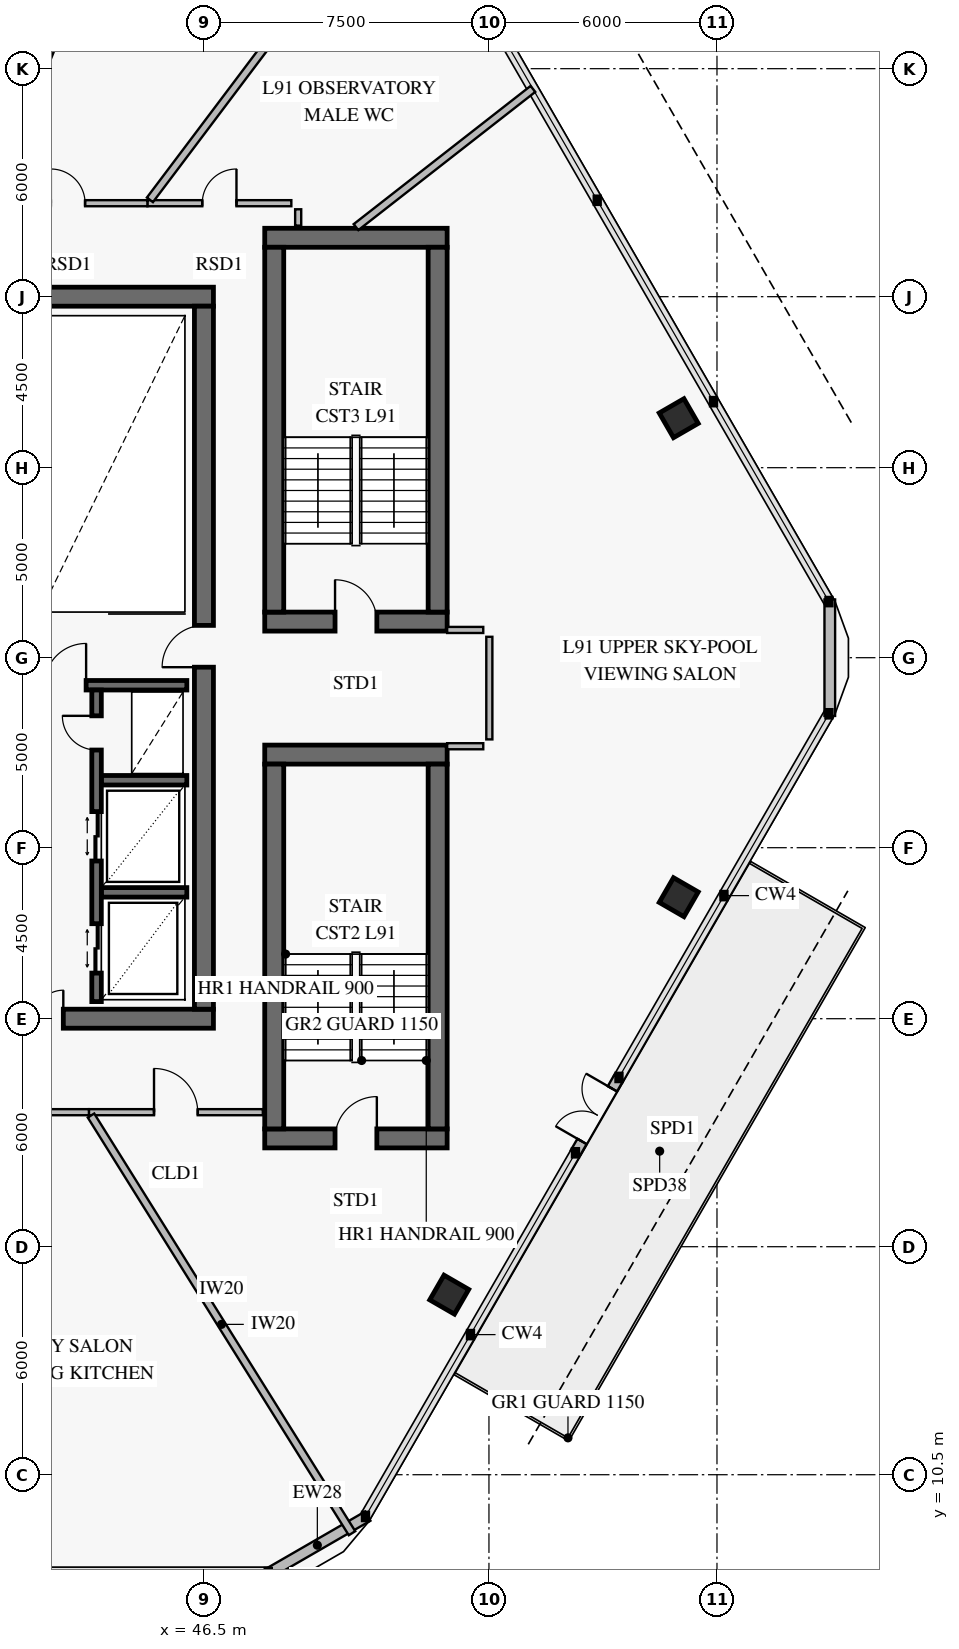
"""IFC4 building model, lengths in metres.
Left out: names, types, materials, properties, quantities, classifications, styles, units other than length and angle.
Written with IfcOpenShell. Run it as: python <this file> out.ifc"""

import sys

from ifc_helpers import new_model, si_unit, direction, frame, frame_2d, origin, origin_2d, place, context, subcontext, project, spatial, rectangle, extrude, element, fill, save


model = new_model("IFC4")
c1 = context("Model", 3, precision=1e-05, world=origin(), true_north=direction((0.0, 1.0)))
c2 = subcontext(c1, "Body", "Model", "MODEL_VIEW")
j1 = project(units=[si_unit("LENGTHUNIT", "METRE"), si_unit("PLANEANGLEUNIT", "RADIAN")], contexts=[c1])
p1 = place(None, origin())
s1 = spatial("IfcSite", under=j1, at=p1, CompositionType="ELEMENT")
p2 = place(p1, origin())
s2 = spatial("IfcBuilding", under=s1, at=p2, CompositionType="ELEMENT")
p3 = place(p2, frame((0.0, 0.0, 357.6)))
s3 = spatial("IfcBuildingStorey", under=s2, at=p3, CompositionType="ELEMENT", Elevation=357.6)
p4 = place(p3, frame((37.35, 22.5, 0.0), z_axis=(0.0, 0.0, 1.0), x_axis=(1.0, 0.0, 0.0)))
e1 = element("IfcWall", 1, at=p4, inside=s3, PredefinedType="SHEAR", context=c2, shape_type="SweptSolid", body=[
    extrude(rectangle(XDim=9.4, YDim=0.5, at=frame_2d((4.7, 0.0))), origin(), (0.0, 0.0, 1.0), 3.8),
])
p5 = place(p4, frame((3.95, 0.0, 0.0)))
e2 = element("IfcOpeningElement", 2, at=p5, cuts=e1, PredefinedType="OPENING", context=c2, shape_type="SweptSolid", body=[
    extrude(rectangle(XDim=1.5, YDim=2.15, at=frame_2d((0.75, 1.075))), frame((0.0, 0.262, 0.0), z_axis=(0.0, -1.0, 0.0), x_axis=(1.0, 0.0, 0.0)), (0.0, 0.0, 1.0), 0.524),
])
p6 = place(p3, frame((46.75, 41.5, 0.0), z_axis=(0.0, 0.0, 1.0), x_axis=(-1.0, 0.0, 0.0)))
e3 = element("IfcWall", 3, at=p6, inside=s3, PredefinedType="SHEAR", context=c2, shape_type="SweptSolid", body=[
    extrude(rectangle(XDim=7.8, YDim=0.5, at=frame_2d((3.9, 0.0))), origin(), (0.0, 0.0, 1.0), 3.8),
])
p7 = place(p3, frame((46.5, 22.75, 0.0), z_axis=(0.0, 0.0, 1.0), x_axis=(0.0, 1.0, 0.0)))
e4 = element("IfcWall", 4, at=p7, inside=s3, PredefinedType="SHEAR", context=c2, shape_type="SweptSolid", body=[
    extrude(rectangle(XDim=18.5, YDim=0.5, at=frame_2d((9.25, 0.0))), origin(), (0.0, 0.0, 1.0), 3.8),
])
p8 = place(p7, frame((9.0, 0.0, 0.0)))
e5 = element("IfcOpeningElement", 5, at=p8, cuts=e4, PredefinedType="OPENING", context=c2, shape_type="SweptSolid", body=[
    extrude(rectangle(XDim=1.1, YDim=2.15, at=frame_2d((0.55, 1.075))), frame((0.0, 0.262, 0.0), z_axis=(0.0, -1.0, 0.0), x_axis=(1.0, 0.0, 0.0)), (0.0, 0.0, 1.0), 0.524),
])
for number, where, z_axis, x_axis in (
    (6, (58.993, 38.302, 0.0), (0.0, 0.0, 1.0), (-0.5, 0.866, 0.0)),
    (7, (52.955, 15.238, 0.0), (0.0, 0.0, 1.0), (0.5, 0.866, 0.0)),
    (8, (58.993, 25.698, 0.0), (0.0, 0.0, 1.0), (0.5, 0.866, 0.0)),
):
    element("IfcColumn", number, at=place(p3, frame(where, z_axis=z_axis, x_axis=x_axis)), inside=s3, PredefinedType="COLUMN", context=c2, shape_type="SweptSolid", body=[
        extrude(rectangle(XDim=0.75, YDim=0.75, at=origin_2d()), origin(), (0.0, 0.0, 1.0), 3.35),
    ])
p9 = place(p3, frame((48.1, 19.35, 0.0), z_axis=(0.0, 0.0, 1.0), x_axis=(1.0, 0.0, 0.0)))
e9 = element("IfcWall", 9, at=p9, inside=s3, PredefinedType="SHEAR", context=c2, shape_type="SweptSolid", body=[
    extrude(rectangle(XDim=4.8, YDim=0.5, at=frame_2d((2.4, 0.0))), origin(), (0.0, 0.0, 1.0), 3.8),
])
p10 = place(p9, frame((1.85, 0.0, 0.0)))
e10 = element("IfcOpeningElement", 10, at=p10, cuts=e9, PredefinedType="OPENING", context=c2, shape_type="SweptSolid", body=[
    extrude(rectangle(XDim=1.1, YDim=2.15, at=frame_2d((0.55, 1.075))), frame((0.0, 0.262, 0.0), z_axis=(0.0, -1.0, 0.0), x_axis=(1.0, 0.0, 0.0)), (0.0, 0.0, 1.0), 0.524),
])
p11 = place(p3, frame((52.9, 29.45, 0.0), z_axis=(0.0, 0.0, 1.0), x_axis=(-1.0, 0.0, 0.0)))
e11 = element("IfcWall", 11, at=p11, inside=s3, PredefinedType="SHEAR", context=c2, shape_type="SweptSolid", body=[
    extrude(rectangle(XDim=4.8, YDim=0.5, at=frame_2d((2.4, 0.0))), origin(), (0.0, 0.0, 1.0), 3.8),
])
for number, where, z_axis, x_axis in (
    (12, (48.35, 19.6, 0.0), (0.0, 0.0, 1.0), (0.0, 1.0, 0.0)),
    (13, (52.65, 29.2, 0.0), (0.0, 0.0, 1.0), (0.0, -1.0, 0.0)),
):
    element("IfcWall", number, at=place(p3, frame(where, z_axis=z_axis, x_axis=x_axis)), inside=s3, PredefinedType="SHEAR", context=c2, shape_type="SweptSolid", body=[
        extrude(rectangle(XDim=9.6, YDim=0.5, at=frame_2d((4.8, 0.0))), origin(), (0.0, 0.0, 1.0), 3.8),
    ])
p12 = place(p3, frame((48.1, 32.95, 0.0), z_axis=(0.0, 0.0, 1.0), x_axis=(1.0, 0.0, 0.0)))
e14 = element("IfcWall", 14, at=p12, inside=s3, PredefinedType="SHEAR", context=c2, shape_type="SweptSolid", body=[
    extrude(rectangle(XDim=4.8, YDim=0.5, at=frame_2d((2.4, 0.0))), origin(), (0.0, 0.0, 1.0), 3.8),
])
p13 = place(p12, frame((1.85, 0.0, 0.0)))
e15 = element("IfcOpeningElement", 15, at=p13, cuts=e14, PredefinedType="OPENING", context=c2, shape_type="SweptSolid", body=[
    extrude(rectangle(XDim=1.1, YDim=2.15, at=frame_2d((0.55, 1.075))), frame((0.0, 0.262, 0.0), z_axis=(0.0, -1.0, 0.0), x_axis=(1.0, 0.0, 0.0)), (0.0, 0.0, 1.0), 0.524),
])
p14 = place(p3, frame((52.9, 43.05, 0.0), z_axis=(0.0, 0.0, 1.0), x_axis=(-1.0, 0.0, 0.0)))
e16 = element("IfcWall", 16, at=p14, inside=s3, PredefinedType="SHEAR", context=c2, shape_type="SweptSolid", body=[
    extrude(rectangle(XDim=4.8, YDim=0.5, at=frame_2d((2.4, 0.0))), origin(), (0.0, 0.0, 1.0), 3.8),
])
for number, where, z_axis, x_axis in (
    (17, (48.35, 33.2, 0.0), (0.0, 0.0, 1.0), (0.0, 1.0, 0.0)),
    (18, (52.65, 42.8, 0.0), (0.0, 0.0, 1.0), (0.0, -1.0, 0.0)),
):
    element("IfcWall", number, at=place(p3, frame(where, z_axis=z_axis, x_axis=x_axis)), inside=s3, PredefinedType="SHEAR", context=c2, shape_type="SweptSolid", body=[
        extrude(rectangle(XDim=9.6, YDim=0.5, at=frame_2d((4.8, 0.0))), origin(), (0.0, 0.0, 1.0), 3.8),
    ])
p15 = place(p3, frame((57.421, 20.955, 0.0), z_axis=(0.0, 0.0, 1.0), x_axis=(-0.499968531483, -0.866043571379, 0.0)))
e19 = element("IfcWall", 19, at=p15, inside=s3, PredefinedType="SOLIDWALL", context=c2, shape_type="SweptSolid", body=[
    extrude(rectangle(XDim=2.29, YDim=0.28, at=frame_2d((1.145, 0.0))), origin(), (0.0, 0.0, 1.0), 3.35),
])
p16 = place(p15, frame((0.345, 0.0, 0.0)))
e20 = element("IfcOpeningElement", 20, at=p16, cuts=e19, PredefinedType="OPENING", context=c2, shape_type="SweptSolid", body=[
    extrude(rectangle(XDim=1.6, YDim=2.3, at=frame_2d((0.8, 1.15))), frame((0.0, 0.152, 0.0), z_axis=(0.0, -1.0, 0.0), x_axis=(1.0, 0.0, 0.0)), (0.0, 0.0, 1.0), 0.304),
])
for number, where, z_axis, x_axis in (
    (21, (50.811, 9.411, 0.0), (0.0, 0.0, 1.0), (-0.866, -0.5, 0.0)),
    (22, (62.969, 33.532, 0.0), (0.0, 0.0, 1.0), (0.0, -1.0, 0.0)),
):
    element("IfcWall", number, at=place(p3, frame(where, z_axis=z_axis, x_axis=x_axis)), inside=s3, PredefinedType="SOLIDWALL", context=c2, shape_type="SweptSolid", body=[
        extrude(rectangle(XDim=3.065, YDim=0.28, at=frame_2d((1.532, 0.0))), origin(), (0.0, 0.0, 1.0), 3.35),
    ])
p17 = place(p3, frame((25.95, 31.275, 0.0), z_axis=(0.0, 0.0, 1.0), x_axis=(1.0, 0.0, 0.0)))
e23 = element("IfcWall", 23, at=p17, inside=s3, PredefinedType="SOLIDWALL", context=c2, shape_type="SweptSolid", body=[
    extrude(rectangle(XDim=20.1, YDim=0.25, at=frame_2d((10.05, 0.0))), origin(), (0.0, 0.0, 1.0), 3.8),
])
p18 = place(p17, frame((2.6, 0.0, 0.0)))
e24 = element("IfcOpeningElement", 24, at=p18, cuts=e23, PredefinedType="OPENING", context=c2, shape_type="SweptSolid", body=[
    extrude(rectangle(XDim=1.1, YDim=2.15, at=frame_2d((0.55, 1.075))), frame((0.0, 0.137, 0.0), z_axis=(0.0, -1.0, 0.0), x_axis=(1.0, 0.0, 0.0)), (0.0, 0.0, 1.0), 0.274),
])
p19 = place(p17, frame((10.6, 0.0, 0.0)))
e25 = element("IfcOpeningElement", 25, at=p19, cuts=e23, PredefinedType="OPENING", context=c2, shape_type="SweptSolid", body=[
    extrude(rectangle(XDim=1.1, YDim=2.15, at=frame_2d((0.55, 1.075))), frame((0.0, 0.137, 0.0), z_axis=(0.0, -1.0, 0.0), x_axis=(1.0, 0.0, 0.0)), (0.0, 0.0, 1.0), 0.274),
])
p20 = place(p17, frame((16.35, 0.0, 0.0)))
e26 = element("IfcOpeningElement", 26, at=p20, cuts=e23, PredefinedType="OPENING", context=c2, shape_type="SweptSolid", body=[
    extrude(rectangle(XDim=1.1, YDim=2.15, at=frame_2d((0.55, 1.075))), frame((0.0, 0.137, 0.0), z_axis=(0.0, -1.0, 0.0), x_axis=(1.0, 0.0, 0.0)), (0.0, 0.0, 1.0), 0.274),
])
for number, where, z_axis, x_axis in (
    (27, (43.8, 25.825, 0.0), (0.0, 0.0, 1.0), (1.0, 0.0, 0.0)),
    (28, (43.8, 28.775, 0.0), (0.0, 0.0, 1.0), (1.0, 0.0, 0.0)),
):
    element("IfcWall", number, at=place(p3, frame(where, z_axis=z_axis, x_axis=x_axis)), inside=s3, PredefinedType="SOLIDWALL", context=c2, shape_type="SweptSolid", body=[
        extrude(rectangle(XDim=2.25, YDim=0.25, at=frame_2d((1.125, 0.0))), origin(), (0.0, 0.0, 1.0), 3.8),
    ])
p21 = place(p3, frame((43.675, 22.95, 0.0), z_axis=(0.0, 0.0, 1.0), x_axis=(0.0, 1.0, 0.0)))
e29 = element("IfcWall", 29, at=p21, inside=s3, PredefinedType="SOLIDWALL", context=c2, shape_type="SweptSolid", body=[
    extrude(rectangle(XDim=8.2, YDim=0.25, at=frame_2d((4.1, 0.0))), origin(), (0.0, 0.0, 1.0), 3.8),
])
p22 = place(p21, frame((0.75, 0.0, 0.0)))
e30 = element("IfcOpeningElement", 30, at=p22, cuts=e29, PredefinedType="OPENING", context=c2, shape_type="SweptSolid", body=[
    extrude(rectangle(XDim=1.3, YDim=2.3, at=frame_2d((0.65, 1.15))), frame((0.0, 0.137, 0.0), z_axis=(0.0, -1.0, 0.0), x_axis=(1.0, 0.0, 0.0)), (0.0, 0.0, 1.0), 0.274),
])
p23 = place(p21, frame((3.7, 0.0, 0.0)))
e31 = element("IfcOpeningElement", 31, at=p23, cuts=e29, PredefinedType="OPENING", context=c2, shape_type="SweptSolid", body=[
    extrude(rectangle(XDim=1.3, YDim=2.3, at=frame_2d((0.65, 1.15))), frame((0.0, 0.137, 0.0), z_axis=(0.0, -1.0, 0.0), x_axis=(1.0, 0.0, 0.0)), (0.0, 0.0, 1.0), 0.274),
])
p24 = place(p21, frame((6.62, 0.0, 0.0)))
e32 = element("IfcOpeningElement", 32, at=p24, cuts=e29, PredefinedType="OPENING", context=c2, shape_type="SweptSolid", body=[
    extrude(rectangle(XDim=0.9, YDim=2.1, at=frame_2d((0.45, 1.05))), frame((0.0, 0.137, 0.0), z_axis=(0.0, -1.0, 0.0), x_axis=(1.0, 0.0, 0.0)), (0.0, 0.0, 1.0), 0.274),
])
p25 = place(p3, frame((43.473, 20.04, 0.0), z_axis=(0.0, 0.0, 1.0), x_axis=(1.0, 0.0, 0.0)))
e33 = element("IfcWall", 33, at=p25, inside=s3, PredefinedType="PARTITIONING", context=c2, shape_type="SweptSolid", body=[
    extrude(rectangle(XDim=4.577, YDim=0.16, at=frame_2d((2.288, 0.0))), origin(), (0.0, 0.0, 1.0), 3.35),
])
p26 = place(p25, frame((1.713, 0.0, 0.0)))
e34 = element("IfcOpeningElement", 34, at=p26, cuts=e33, PredefinedType="OPENING", context=c2, shape_type="SweptSolid", body=[
    extrude(rectangle(XDim=1.15, YDim=2.2, at=frame_2d((0.575, 1.1))), frame((0.0, 0.092, 0.0), z_axis=(0.0, -1.0, 0.0), x_axis=(1.0, 0.0, 0.0)), (0.0, 0.0, 1.0), 0.184),
])
p27 = place(p3, frame((48.8, 43.96, 0.0), z_axis=(0.0, 0.0, 1.0), x_axis=(-1.0, 0.0, 0.0)))
e35 = element("IfcWall", 35, at=p27, inside=s3, PredefinedType="PARTITIONING", context=c2, shape_type="SweptSolid", body=[
    extrude(rectangle(XDim=3.788, YDim=0.16, at=frame_2d((1.894, 0.0))), origin(), (0.0, 0.0, 1.0), 3.35),
])
p28 = place(p27, frame((1.444, 0.0, 0.0)))
e36 = element("IfcOpeningElement", 36, at=p28, cuts=e35, PredefinedType="OPENING", context=c2, shape_type="SweptSolid", body=[
    extrude(rectangle(XDim=0.9, YDim=2.1, at=frame_2d((0.45, 1.05))), frame((0.0, 0.092, 0.0), z_axis=(0.0, -1.0, 0.0), x_axis=(1.0, 0.0, 0.0)), (0.0, 0.0, 1.0), 0.184),
])
p29 = place(p3, frame((45.012, 43.96, 0.0), z_axis=(0.0, 0.0, 1.0), x_axis=(-1.0, 0.0, 0.0)))
e37 = element("IfcWall", 37, at=p29, inside=s3, PredefinedType="PARTITIONING", context=c2, shape_type="SweptSolid", body=[
    extrude(rectangle(XDim=4.18, YDim=0.16, at=frame_2d((2.09, 0.0))), origin(), (0.0, 0.0, 1.0), 3.35),
])
p30 = place(p29, frame((1.64, 0.0, 0.0)))
e38 = element("IfcOpeningElement", 38, at=p30, cuts=e37, PredefinedType="OPENING", context=c2, shape_type="SweptSolid", body=[
    extrude(rectangle(XDim=0.9, YDim=2.1, at=frame_2d((0.45, 1.05))), frame((0.0, 0.092, 0.0), z_axis=(0.0, -1.0, 0.0), x_axis=(1.0, 0.0, 0.0)), (0.0, 0.0, 1.0), 0.184),
])
p31 = place(p3, frame((37.681, 20.04, 0.0), z_axis=(0.0, 0.0, 1.0), x_axis=(1.0, 0.0, 0.0)))
e39 = element("IfcWall", 39, at=p31, inside=s3, PredefinedType="PARTITIONING", context=c2, shape_type="SweptSolid", body=[
    extrude(rectangle(XDim=5.792, YDim=0.16, at=frame_2d((2.896, 0.0))), origin(), (0.0, 0.0, 1.0), 2.8),
])
p32 = place(p31, frame((2.421, 0.0, 0.0)))
e40 = element("IfcOpeningElement", 40, at=p32, cuts=e39, PredefinedType="OPENING", context=c2, shape_type="SweptSolid", body=[
    extrude(rectangle(XDim=0.95, YDim=2.1, at=frame_2d((0.475, 1.05))), frame((0.0, 0.092, 0.0), z_axis=(0.0, -1.0, 0.0), x_axis=(1.0, 0.0, 0.0)), (0.0, 0.0, 1.0), 0.184),
])
p33 = place(p3, frame((43.528, 19.952, 0.0), z_axis=(0.0, 0.0, 1.0), x_axis=(0.529929518021, -0.848041688793, 0.0)))
e41 = element("IfcWall", 41, at=p33, inside=s3, PredefinedType="PARTITIONING", context=c2, shape_type="SweptSolid", body=[
    extrude(rectangle(XDim=12.961, YDim=0.2, at=frame_2d((6.48, 0.0))), origin(), (0.0, 0.0, 1.0), 2.77),
])
p34 = place(p3, frame((54.01, 29.85, 0.0), z_axis=(0.0, 0.0, 1.0), x_axis=(0.0, 1.0, 0.0)))
e42 = element("IfcWall", 42, at=p34, inside=s3, PredefinedType="PARTITIONING", context=c2, shape_type="SweptSolid", body=[
    extrude(rectangle(XDim=2.7, YDim=0.16, at=frame_2d((1.35, 0.0))), origin(), (0.0, 0.0, 1.0), 3.35),
])
p35 = place(p3, frame((50.502, 43.33, 0.0), z_axis=(0.0, 0.0, 1.0), x_axis=(0.788021867537, 0.615647249879, 0.0)))
e43 = element("IfcWall", 43, at=p35, inside=s3, PredefinedType="PARTITIONING", context=c2, shape_type="SweptSolid", body=[
    extrude(rectangle(XDim=5.907, YDim=0.2, at=frame_2d((2.954, 0.0))), origin(), (0.0, 0.0, 1.0), 2.77),
])
p36 = place(p3, frame((45.079, 44.048, 0.0), z_axis=(0.0, 0.0, 1.0), x_axis=(0.601830257004, 0.798624030288, 0.0)))
e44 = element("IfcWall", 44, at=p36, inside=s3, PredefinedType="PARTITIONING", context=c2, shape_type="SweptSolid", body=[
    extrude(rectangle(XDim=11.067, YDim=0.2, at=frame_2d((5.534, 0.0))), origin(), (0.0, 0.0, 1.0), 2.77),
])
p37 = place(p3, frame((40.868, 44.048, 0.0), z_axis=(0.0, 0.0, 1.0), x_axis=(0.374624373524, 0.927176670738, 0.0)))
e45 = element("IfcWall", 45, at=p37, inside=s3, PredefinedType="PARTITIONING", context=c2, shape_type="SweptSolid", body=[
    extrude(rectangle(XDim=4.254, YDim=0.2, at=frame_2d((2.127, 0.0))), origin(), (0.0, 0.0, 1.0), 3.35),
])
for number, where, z_axis, x_axis in (
    (46, (52.9, 29.67, 0.0), (0.0, 0.0, 1.0), (1.0, 0.0, 0.0)),
    (47, (53.85, 32.73, 0.0), (0.0, 0.0, 1.0), (-1.0, 0.0, 0.0)),
):
    element("IfcWall", number, at=place(p3, frame(where, z_axis=z_axis, x_axis=x_axis)), inside=s3, PredefinedType="PARTITIONING", context=c2, shape_type="SweptSolid", body=[
        extrude(rectangle(XDim=0.95, YDim=0.16, at=frame_2d((0.475, 0.0))), origin(), (0.0, 0.0, 1.0), 3.35),
    ])
p38 = place(p3, frame((48.98, 43.37, 0.0), z_axis=(0.0, 0.0, 1.0), x_axis=(0.0, 1.0, 0.0)))
e48 = element("IfcWall", 48, at=p38, inside=s3, PredefinedType="PARTITIONING", context=c2, shape_type="SweptSolid", body=[
    extrude(rectangle(XDim=0.43, YDim=0.16, at=frame_2d((0.215, 0.0))), origin(), (0.0, 0.0, 1.0), 3.35),
])
p39 = place(p16, frame((1.6, 0.0, 0.0), z_axis=(0.0, 0.0, 1.0), x_axis=(-1.0, 0.0, 0.0)))
e49 = element("IfcDoor", 49, at=p39, inside=s3, OperationType="DOUBLE_DOOR_SINGLE_SWING", PredefinedType="DOOR", context=c2, shape_type="SweptSolid", body=[
    extrude(rectangle(XDim=1.6, YDim=2.3, at=frame_2d((0.8, 1.15))), frame((0.0, 0.025, 0.0), z_axis=(0.0, -1.0, 0.0), x_axis=(1.0, 0.0, 0.0)), (0.0, 0.0, 1.0), 0.05),
])
fill(e20, e49)
p40 = place(p8, origin())
e50 = element("IfcDoor", 50, at=p40, inside=s3, OperationType="SINGLE_SWING_LEFT", PredefinedType="USERDEFINED", context=c2, shape_type="SweptSolid", body=[
    extrude(rectangle(XDim=1.1, YDim=2.15, at=frame_2d((0.55, 1.075))), frame((0.0, 0.025, 0.0), z_axis=(0.0, -1.0, 0.0), x_axis=(1.0, 0.0, 0.0)), (0.0, 0.0, 1.0), 0.05),
])
fill(e5, e50)
p41 = place(p5, origin())
e51 = element("IfcDoor", 51, at=p41, inside=s3, OperationType="DOUBLE_DOOR_SINGLE_SWING", PredefinedType="DOOR", context=c2, shape_type="SweptSolid", body=[
    extrude(rectangle(XDim=1.5, YDim=2.15, at=frame_2d((0.75, 1.075))), frame((0.0, 0.025, 0.0), z_axis=(0.0, -1.0, 0.0), x_axis=(1.0, 0.0, 0.0)), (0.0, 0.0, 1.0), 0.05),
])
fill(e2, e51)
p42 = place(p10, origin())
e52 = element("IfcDoor", 52, at=p42, inside=s3, OperationType="SINGLE_SWING_RIGHT", PredefinedType="USERDEFINED", context=c2, shape_type="SweptSolid", body=[
    extrude(rectangle(XDim=1.1, YDim=2.15, at=frame_2d((0.55, 1.075))), frame((0.0, 0.025, 0.0), z_axis=(0.0, -1.0, 0.0), x_axis=(1.0, 0.0, 0.0)), (0.0, 0.0, 1.0), 0.05),
])
fill(e10, e52)
p43 = place(p13, origin())
e53 = element("IfcDoor", 53, at=p43, inside=s3, OperationType="SINGLE_SWING_LEFT", PredefinedType="USERDEFINED", context=c2, shape_type="SweptSolid", body=[
    extrude(rectangle(XDim=1.1, YDim=2.15, at=frame_2d((0.55, 1.075))), frame((0.0, 0.025, 0.0), z_axis=(0.0, -1.0, 0.0), x_axis=(1.0, 0.0, 0.0)), (0.0, 0.0, 1.0), 0.05),
])
fill(e15, e53)
p44 = place(p20, origin())
e54 = element("IfcDoor", 54, at=p44, inside=s3, OperationType="SINGLE_SWING_RIGHT", PredefinedType="USERDEFINED", context=c2, shape_type="SweptSolid", body=[
    extrude(rectangle(XDim=1.1, YDim=2.15, at=frame_2d((0.55, 1.075))), frame((0.0, 0.025, 0.0), z_axis=(0.0, -1.0, 0.0), x_axis=(1.0, 0.0, 0.0)), (0.0, 0.0, 1.0), 0.05),
])
fill(e26, e54)
p45 = place(p22, origin())
e55 = element("IfcDoor", 55, at=p45, inside=s3, OperationType="DOUBLE_DOOR_SLIDING", PredefinedType="DOOR", context=c2, shape_type="SweptSolid", body=[
    extrude(rectangle(XDim=1.3, YDim=2.3, at=frame_2d((0.65, 1.15))), frame((0.0, 0.025, 0.0), z_axis=(0.0, -1.0, 0.0), x_axis=(1.0, 0.0, 0.0)), (0.0, 0.0, 1.0), 0.05),
])
fill(e30, e55)
p46 = place(p23, origin())
e56 = element("IfcDoor", 56, at=p46, inside=s3, OperationType="DOUBLE_DOOR_SLIDING", PredefinedType="DOOR", context=c2, shape_type="SweptSolid", body=[
    extrude(rectangle(XDim=1.3, YDim=2.3, at=frame_2d((0.65, 1.15))), frame((0.0, 0.025, 0.0), z_axis=(0.0, -1.0, 0.0), x_axis=(1.0, 0.0, 0.0)), (0.0, 0.0, 1.0), 0.05),
])
fill(e31, e56)
p47 = place(p24, origin())
e57 = element("IfcDoor", 57, at=p47, inside=s3, OperationType="SINGLE_SWING_RIGHT", PredefinedType="DOOR", context=c2, shape_type="SweptSolid", body=[
    extrude(rectangle(XDim=0.9, YDim=2.1, at=frame_2d((0.45, 1.05))), frame((0.0, 0.025, 0.0), z_axis=(0.0, -1.0, 0.0), x_axis=(1.0, 0.0, 0.0)), (0.0, 0.0, 1.0), 0.05),
])
fill(e32, e57)
p48 = place(p26, origin())
e58 = element("IfcDoor", 58, at=p48, inside=s3, OperationType="SINGLE_SWING_LEFT", PredefinedType="DOOR", context=c2, shape_type="SweptSolid", body=[
    extrude(rectangle(XDim=1.15, YDim=2.2, at=frame_2d((0.575, 1.1))), frame((0.0, 0.025, 0.0), z_axis=(0.0, -1.0, 0.0), x_axis=(1.0, 0.0, 0.0)), (0.0, 0.0, 1.0), 0.05),
])
fill(e34, e58)
p49 = place(p28, frame((0.9, 0.0, 0.0), z_axis=(0.0, 0.0, 1.0), x_axis=(-1.0, 0.0, 0.0)))
e59 = element("IfcDoor", 59, at=p49, inside=s3, OperationType="SINGLE_SWING_RIGHT", PredefinedType="DOOR", context=c2, shape_type="SweptSolid", body=[
    extrude(rectangle(XDim=0.9, YDim=2.1, at=frame_2d((0.45, 1.05))), frame((0.0, 0.025, 0.0), z_axis=(0.0, -1.0, 0.0), x_axis=(1.0, 0.0, 0.0)), (0.0, 0.0, 1.0), 0.05),
])
fill(e36, e59)
p50 = place(p30, frame((0.9, 0.0, 0.0), z_axis=(0.0, 0.0, 1.0), x_axis=(-1.0, 0.0, 0.0)))
e60 = element("IfcDoor", 60, at=p50, inside=s3, OperationType="SINGLE_SWING_LEFT", PredefinedType="DOOR", context=c2, shape_type="SweptSolid", body=[
    extrude(rectangle(XDim=0.9, YDim=2.1, at=frame_2d((0.45, 1.05))), frame((0.0, 0.025, 0.0), z_axis=(0.0, -1.0, 0.0), x_axis=(1.0, 0.0, 0.0)), (0.0, 0.0, 1.0), 0.05),
])
fill(e38, e60)
save(model, sys.argv[1])
